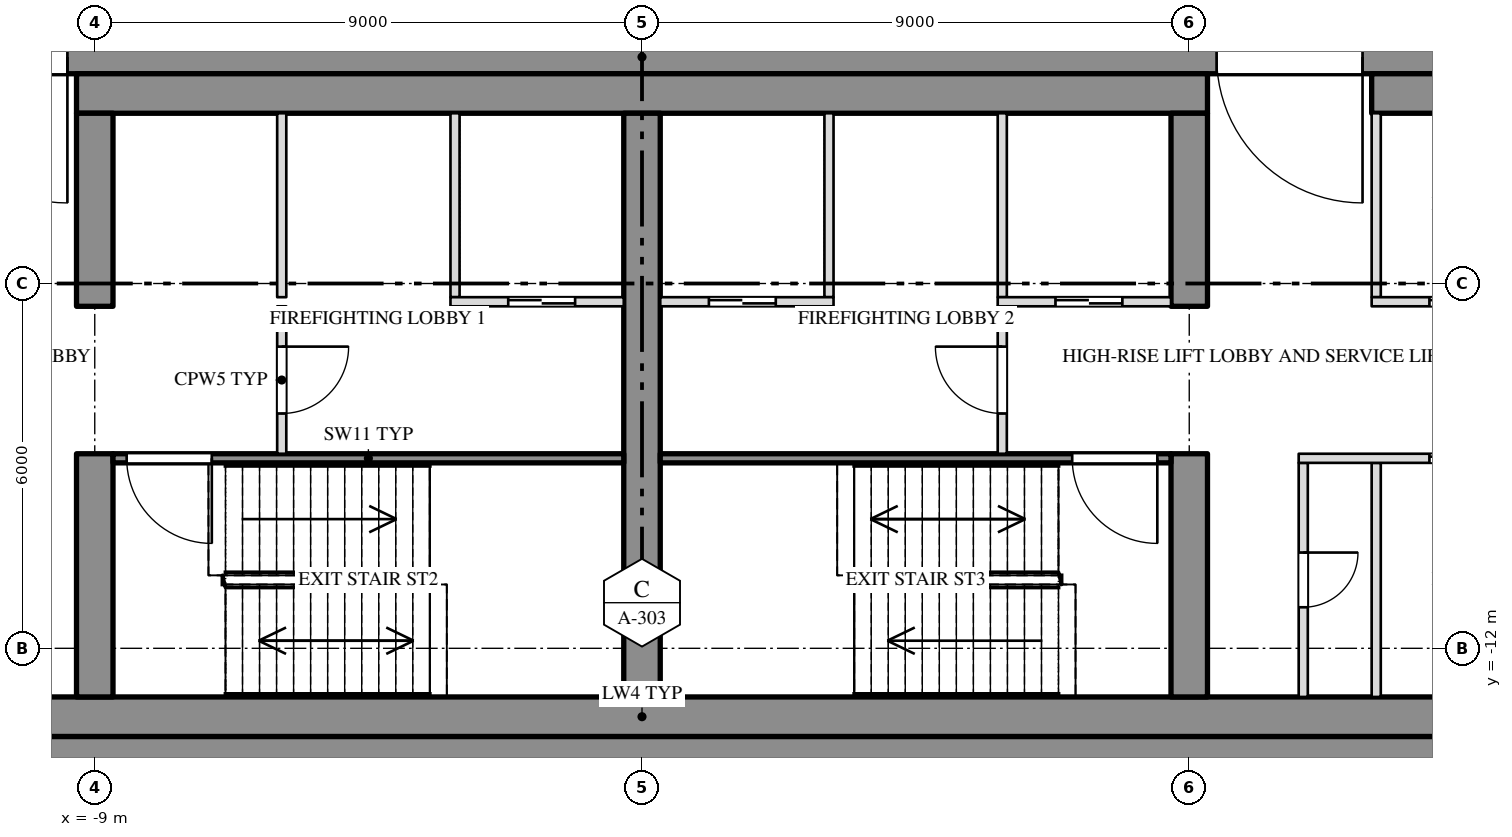
"""IFC4 building model, lengths in metres.
Left out: names, types, materials, properties, quantities, classifications, styles, units other than length and angle.
Written with IfcOpenShell. Run it as: python <this file> out.ifc"""

import sys

from ifc_helpers import new_model, si_unit, direction, frame, frame_2d, origin, place, context, subcontext, project, spatial, rectangle, extrude, element, fill, save


model = new_model("IFC4")
c1 = context("Model", 3, precision=1e-05, world=origin(), true_north=direction((0.0, 1.0)))
c2 = subcontext(c1, "Body", "Model", "MODEL_VIEW")
j1 = project(units=[si_unit("LENGTHUNIT", "METRE"), si_unit("PLANEANGLEUNIT", "RADIAN")], contexts=[c1])
p1 = place(None, origin())
s1 = spatial("IfcSite", under=j1, at=p1, CompositionType="ELEMENT")
p2 = place(p1, origin())
s2 = spatial("IfcBuilding", under=s1, at=p2, CompositionType="ELEMENT")
p3 = place(p2, frame((0.0, 0.0, 288.5)))
s3 = spatial("IfcBuildingStorey", under=s2, at=p3, CompositionType="ELEMENT", Elevation=288.5)
p4 = place(p3, frame((-27.0, -2.275, 0.0), z_axis=(0.0, 0.0, 1.0), x_axis=(1.0, 0.0, 0.0)))
e1 = element("IfcWall", 1, at=p4, inside=s3, PredefinedType="SHEAR", context=c2, shape_type="SweptSolid", body=[
    extrude(rectangle(XDim=54.0, YDim=0.55, at=frame_2d((27.0, 0.0))), origin(), (0.0, 0.0, 1.0), 3.78),
])
p5 = place(p4, frame((15.15, 0.0, 0.0)))
e2 = element("IfcOpeningElement", 2, at=p5, cuts=e1, PredefinedType="OPENING", context=c2, shape_type="SweptSolid", body=[
    extrude(rectangle(XDim=2.4, YDim=2.1, at=frame_2d((1.2, 1.05))), frame((0.0, 0.287, 0.0), z_axis=(0.0, -1.0, 0.0), x_axis=(1.0, 0.0, 0.0)), (0.0, 0.0, 1.0), 0.574),
])
p6 = place(p4, frame((36.45, 0.0, 0.0)))
e3 = element("IfcOpeningElement", 3, at=p6, cuts=e1, PredefinedType="OPENING", context=c2, shape_type="SweptSolid", body=[
    extrude(rectangle(XDim=2.4, YDim=2.1, at=frame_2d((1.2, 1.05))), frame((0.0, 0.287, 0.0), z_axis=(0.0, -1.0, 0.0), x_axis=(1.0, 0.0, 0.0)), (0.0, 0.0, 1.0), 0.574),
])
p7 = place(p3, frame((-27.0, -13.725, 0.0), z_axis=(0.0, 0.0, 1.0), x_axis=(1.0, 0.0, 0.0)))
e4 = element("IfcWall", 4, at=p7, inside=s3, PredefinedType="SHEAR", context=c2, shape_type="SweptSolid", body=[
    extrude(rectangle(XDim=54.0, YDim=0.55, at=frame_2d((27.0, 0.0))), origin(), (0.0, 0.0, 1.0), 3.78),
])
p8 = place(p3, frame((-9.3, -2.875, 0.0), z_axis=(0.0, 0.0, 1.0), x_axis=(1.0, 0.0, 0.0)))
e5 = element("IfcWall", 5, at=p8, inside=s3, PredefinedType="SHEAR", context=c2, shape_type="SweptSolid", body=[
    extrude(rectangle(XDim=18.6, YDim=0.65, at=frame_2d((9.3, 0.0))), origin(), (0.0, 0.0, 1.0), 3.78),
])
p9 = place(p3, frame((12.0, -2.875, 0.0), z_axis=(0.0, 0.0, 1.0), x_axis=(1.0, 0.0, 0.0)))
e6 = element("IfcWall", 6, at=p9, inside=s3, PredefinedType="SHEAR", context=c2, shape_type="SweptSolid", body=[
    extrude(rectangle(XDim=14.45, YDim=0.65, at=frame_2d((7.225, 0.0))), origin(), (0.0, 0.0, 1.0), 3.78),
])
p10 = place(p3, frame((-26.45, -13.125, 0.0), z_axis=(0.0, 0.0, 1.0), x_axis=(1.0, 0.0, 0.0)))
e7 = element("IfcWall", 7, at=p10, inside=s3, PredefinedType="SHEAR", context=c2, shape_type="SweptSolid", body=[
    extrude(rectangle(XDim=52.9, YDim=0.65, at=frame_2d((26.45, 0.0))), origin(), (0.0, 0.0, 1.0), 3.78),
])
p11 = place(p3, frame((-9.0, -12.8, 0.0), z_axis=(0.0, 0.0, 1.0), x_axis=(0.0, 1.0, 0.0)))
e8 = element("IfcWall", 8, at=p11, inside=s3, PredefinedType="SHEAR", context=c2, shape_type="SweptSolid", body=[
    extrude(rectangle(XDim=4.0, YDim=0.6, at=frame_2d((2.0, 0.0))), origin(), (0.0, 0.0, 1.0), 3.78),
])
p12 = place(p3, frame((-9.0, -6.375, 0.0), z_axis=(0.0, 0.0, 1.0), x_axis=(0.0, 1.0, 0.0)))
e9 = element("IfcWall", 9, at=p12, inside=s3, PredefinedType="SHEAR", context=c2, shape_type="SweptSolid", body=[
    extrude(rectangle(XDim=3.175, YDim=0.6, at=frame_2d((1.587, 0.0))), origin(), (0.0, 0.0, 1.0), 3.78),
])
p13 = place(p3, frame((0.0, -12.8, 0.0), z_axis=(0.0, 0.0, 1.0), x_axis=(0.0, 1.0, 0.0)))
e10 = element("IfcWall", 10, at=p13, inside=s3, PredefinedType="SHEAR", context=c2, shape_type="SweptSolid", body=[
    extrude(rectangle(XDim=9.6, YDim=0.6, at=frame_2d((4.8, 0.0))), origin(), (0.0, 0.0, 1.0), 3.78),
])
p14 = place(p3, frame((9.0, -12.8, 0.0), z_axis=(0.0, 0.0, 1.0), x_axis=(0.0, 1.0, 0.0)))
e11 = element("IfcWall", 11, at=p14, inside=s3, PredefinedType="SHEAR", context=c2, shape_type="SweptSolid", body=[
    extrude(rectangle(XDim=4.0, YDim=0.6, at=frame_2d((2.0, 0.0))), origin(), (0.0, 0.0, 1.0), 3.78),
])
p15 = place(p3, frame((9.0, -6.375, 0.0), z_axis=(0.0, 0.0, 1.0), x_axis=(0.0, 1.0, 0.0)))
e12 = element("IfcWall", 12, at=p15, inside=s3, PredefinedType="SHEAR", context=c2, shape_type="SweptSolid", body=[
    extrude(rectangle(XDim=3.175, YDim=0.6, at=frame_2d((1.587, 0.0))), origin(), (0.0, 0.0, 1.0), 3.78),
])
for number, where, z_axis, x_axis in (
    (13, (-3.075, -6.225, 0.0), (0.0, 0.0, 1.0), (0.0, 1.0, 0.0)),
    (14, (-5.925, -6.225, 0.0), (0.0, 0.0, 1.0), (0.0, 1.0, 0.0)),
    (15, (3.075, -6.225, 0.0), (0.0, 0.0, 1.0), (0.0, 1.0, 0.0)),
    (16, (5.925, -6.225, 0.0), (0.0, 0.0, 1.0), (0.0, 1.0, 0.0)),
    (17, (12.075, -6.225, 0.0), (0.0, 0.0, 1.0), (0.0, 1.0, 0.0)),
):
    element("IfcWall", number, at=place(p3, frame(where, z_axis=z_axis, x_axis=x_axis)), inside=s3, PredefinedType="PARTITIONING", context=c2, shape_type="SweptSolid", body=[
        extrude(rectangle(XDim=3.025, YDim=0.15, at=frame_2d((1.513, 0.0))), origin(), (0.0, 0.0, 1.0), 3.78),
    ])
p16 = place(p3, frame((10.875, -12.8, 0.0), z_axis=(0.0, 0.0, 1.0), x_axis=(0.0, 1.0, 0.0)))
e18 = element("IfcWall", 18, at=p16, inside=s3, PredefinedType="PARTITIONING", context=c2, shape_type="SweptSolid", body=[
    extrude(rectangle(XDim=3.85, YDim=0.15, at=frame_2d((1.925, 0.0))), origin(), (0.0, 0.0, 1.0), 3.78),
])
p17 = place(p16, frame((1.475, 0.0, 0.0)))
e19 = element("IfcOpeningElement", 19, at=p17, cuts=e18, PredefinedType="OPENING", context=c2, shape_type="SweptSolid", body=[
    extrude(rectangle(XDim=0.9, YDim=2.1, at=frame_2d((0.45, 1.05))), frame((0.0, 0.087, 0.0), z_axis=(0.0, -1.0, 0.0), x_axis=(1.0, 0.0, 0.0)), (0.0, 0.0, 1.0), 0.174),
])
p18 = place(p3, frame((12.075, -12.8, 0.0), z_axis=(0.0, 0.0, 1.0), x_axis=(0.0, 1.0, 0.0)))
e20 = element("IfcWall", 20, at=p18, inside=s3, PredefinedType="PARTITIONING", context=c2, shape_type="SweptSolid", body=[
    extrude(rectangle(XDim=3.85, YDim=0.15, at=frame_2d((1.925, 0.0))), origin(), (0.0, 0.0, 1.0), 3.78),
])
p19 = place(p3, frame((-5.925, -8.8, 0.0), z_axis=(0.0, 0.0, 1.0), x_axis=(0.0, 1.0, 0.0)))
e21 = element("IfcWall", 21, at=p19, inside=s3, PredefinedType="PARTITIONING", context=c2, shape_type="SweptSolid", body=[
    extrude(rectangle(XDim=2.425, YDim=0.15, at=frame_2d((1.212, 0.0))), origin(), (0.0, 0.0, 1.0), 3.78),
])
p20 = place(p19, frame((0.662, 0.0, 0.0)))
e22 = element("IfcOpeningElement", 22, at=p20, cuts=e21, PredefinedType="OPENING", context=c2, shape_type="SweptSolid", body=[
    extrude(rectangle(XDim=1.1, YDim=2.1, at=frame_2d((0.55, 1.05))), frame((0.0, 0.087, 0.0), z_axis=(0.0, -1.0, 0.0), x_axis=(1.0, 0.0, 0.0)), (0.0, 0.0, 1.0), 0.174),
])
p21 = place(p3, frame((5.925, -8.8, 0.0), z_axis=(0.0, 0.0, 1.0), x_axis=(0.0, 1.0, 0.0)))
e23 = element("IfcWall", 23, at=p21, inside=s3, PredefinedType="PARTITIONING", context=c2, shape_type="SweptSolid", body=[
    extrude(rectangle(XDim=2.425, YDim=0.15, at=frame_2d((1.212, 0.0))), origin(), (0.0, 0.0, 1.0), 3.78),
])
p22 = place(p21, frame((0.662, 0.0, 0.0)))
e24 = element("IfcOpeningElement", 24, at=p22, cuts=e23, PredefinedType="OPENING", context=c2, shape_type="SweptSolid", body=[
    extrude(rectangle(XDim=1.1, YDim=2.1, at=frame_2d((0.55, 1.05))), frame((0.0, 0.087, 0.0), z_axis=(0.0, -1.0, 0.0), x_axis=(1.0, 0.0, 0.0)), (0.0, 0.0, 1.0), 0.174),
])
p23 = place(p3, frame((-3.15, -6.3, 0.0), z_axis=(0.0, 0.0, 1.0), x_axis=(1.0, 0.0, 0.0)))
e25 = element("IfcWall", 25, at=p23, inside=s3, PredefinedType="PARTITIONING", context=c2, shape_type="SweptSolid", body=[
    extrude(rectangle(XDim=2.85, YDim=0.15, at=frame_2d((1.425, 0.0))), origin(), (0.0, 0.0, 1.0), 3.78),
])
p24 = place(p23, frame((0.95, 0.0, 0.0)))
e26 = element("IfcOpeningElement", 26, at=p24, cuts=e25, PredefinedType="OPENING", context=c2, shape_type="SweptSolid", body=[
    extrude(rectangle(XDim=1.1, YDim=2.1, at=frame_2d((0.55, 1.05))), frame((0.0, 0.087, 0.0), z_axis=(0.0, -1.0, 0.0), x_axis=(1.0, 0.0, 0.0)), (0.0, 0.0, 1.0), 0.174),
])
p25 = place(p3, frame((0.3, -6.3, 0.0), z_axis=(0.0, 0.0, 1.0), x_axis=(1.0, 0.0, 0.0)))
e27 = element("IfcWall", 27, at=p25, inside=s3, PredefinedType="PARTITIONING", context=c2, shape_type="SweptSolid", body=[
    extrude(rectangle(XDim=2.85, YDim=0.15, at=frame_2d((1.425, 0.0))), origin(), (0.0, 0.0, 1.0), 3.78),
])
p26 = place(p25, frame((0.8, 0.0, 0.0)))
e28 = element("IfcOpeningElement", 28, at=p26, cuts=e27, PredefinedType="OPENING", context=c2, shape_type="SweptSolid", body=[
    extrude(rectangle(XDim=1.1, YDim=2.1, at=frame_2d((0.55, 1.05))), frame((0.0, 0.087, 0.0), z_axis=(0.0, -1.0, 0.0), x_axis=(1.0, 0.0, 0.0)), (0.0, 0.0, 1.0), 0.174),
])
p27 = place(p3, frame((5.85, -6.3, 0.0), z_axis=(0.0, 0.0, 1.0), x_axis=(1.0, 0.0, 0.0)))
e29 = element("IfcWall", 29, at=p27, inside=s3, PredefinedType="PARTITIONING", context=c2, shape_type="SweptSolid", body=[
    extrude(rectangle(XDim=2.85, YDim=0.15, at=frame_2d((1.425, 0.0))), origin(), (0.0, 0.0, 1.0), 3.78),
])
p28 = place(p27, frame((0.95, 0.0, 0.0)))
e30 = element("IfcOpeningElement", 30, at=p28, cuts=e29, PredefinedType="OPENING", context=c2, shape_type="SweptSolid", body=[
    extrude(rectangle(XDim=1.1, YDim=2.1, at=frame_2d((0.55, 1.05))), frame((0.0, 0.087, 0.0), z_axis=(0.0, -1.0, 0.0), x_axis=(1.0, 0.0, 0.0)), (0.0, 0.0, 1.0), 0.174),
])
p29 = place(p3, frame((12.0, -6.3, 0.0), z_axis=(0.0, 0.0, 1.0), x_axis=(1.0, 0.0, 0.0)))
e31 = element("IfcWall", 31, at=p29, inside=s3, PredefinedType="PARTITIONING", context=c2, shape_type="SweptSolid", body=[
    extrude(rectangle(XDim=5.7, YDim=0.15, at=frame_2d((2.85, 0.0))), origin(), (0.0, 0.0, 1.0), 3.78),
])
p30 = place(p29, frame((0.95, 0.0, 0.0)))
e32 = element("IfcOpeningElement", 32, at=p30, cuts=e31, PredefinedType="OPENING", context=c2, shape_type="SweptSolid", body=[
    extrude(rectangle(XDim=1.1, YDim=2.1, at=frame_2d((0.55, 1.05))), frame((0.0, 0.087, 0.0), z_axis=(0.0, -1.0, 0.0), x_axis=(1.0, 0.0, 0.0)), (0.0, 0.0, 1.0), 0.174),
])
p31 = place(p29, frame((3.8, 0.0, 0.0)))
e33 = element("IfcOpeningElement", 33, at=p31, cuts=e31, PredefinedType="OPENING", context=c2, shape_type="SweptSolid", body=[
    extrude(rectangle(XDim=1.1, YDim=2.1, at=frame_2d((0.55, 1.05))), frame((0.0, 0.087, 0.0), z_axis=(0.0, -1.0, 0.0), x_axis=(1.0, 0.0, 0.0)), (0.0, 0.0, 1.0), 0.174),
])
p32 = place(p3, frame((-8.7, -8.875, 0.0), z_axis=(0.0, 0.0, 1.0), x_axis=(1.0, 0.0, 0.0)))
e34 = element("IfcWall", 34, at=p32, inside=s3, PredefinedType="SHEAR", context=c2, shape_type="SweptSolid", body=[
    extrude(rectangle(XDim=8.4, YDim=0.15, at=frame_2d((4.2, 0.0))), origin(), (0.0, 0.0, 1.0), 3.78),
])
p33 = place(p32, frame((0.225, 0.0, 0.0)))
e35 = element("IfcOpeningElement", 35, at=p33, cuts=e34, PredefinedType="OPENING", context=c2, shape_type="SweptSolid", body=[
    extrude(rectangle(XDim=1.4, YDim=2.1, at=frame_2d((0.7, 1.05))), frame((0.0, 0.087, 0.0), z_axis=(0.0, -1.0, 0.0), x_axis=(1.0, 0.0, 0.0)), (0.0, 0.0, 1.0), 0.174),
])
p34 = place(p3, frame((0.3, -8.875, 0.0), z_axis=(0.0, 0.0, 1.0), x_axis=(1.0, 0.0, 0.0)))
e36 = element("IfcWall", 36, at=p34, inside=s3, PredefinedType="SHEAR", context=c2, shape_type="SweptSolid", body=[
    extrude(rectangle(XDim=8.4, YDim=0.15, at=frame_2d((4.2, 0.0))), origin(), (0.0, 0.0, 1.0), 3.78),
])
p35 = place(p34, frame((6.775, 0.0, 0.0)))
e37 = element("IfcOpeningElement", 37, at=p35, cuts=e36, PredefinedType="OPENING", context=c2, shape_type="SweptSolid", body=[
    extrude(rectangle(XDim=1.4, YDim=2.1, at=frame_2d((0.7, 1.05))), frame((0.0, 0.087, 0.0), z_axis=(0.0, -1.0, 0.0), x_axis=(1.0, 0.0, 0.0)), (0.0, 0.0, 1.0), 0.174),
])
p36 = place(p3, frame((10.8, -8.875, 0.0), z_axis=(0.0, 0.0, 1.0), x_axis=(1.0, 0.0, 0.0)))
e38 = element("IfcWall", 38, at=p36, inside=s3, PredefinedType="PARTITIONING", context=c2, shape_type="SweptSolid", body=[
    extrude(rectangle(XDim=6.9, YDim=0.15, at=frame_2d((3.45, 0.0))), origin(), (0.0, 0.0, 1.0), 3.78),
])
p37 = place(p36, frame((2.15, 0.0, 0.0)))
e39 = element("IfcOpeningElement", 39, at=p37, cuts=e38, PredefinedType="OPENING", context=c2, shape_type="SweptSolid", body=[
    extrude(rectangle(XDim=1.1, YDim=2.1, at=frame_2d((0.55, 1.05))), frame((0.0, 0.087, 0.0), z_axis=(0.0, -1.0, 0.0), x_axis=(1.0, 0.0, 0.0)), (0.0, 0.0, 1.0), 0.174),
])
p38 = place(p36, frame((5.0, 0.0, 0.0)))
e40 = element("IfcOpeningElement", 40, at=p38, cuts=e38, PredefinedType="OPENING", context=c2, shape_type="SweptSolid", body=[
    extrude(rectangle(XDim=1.1, YDim=2.1, at=frame_2d((0.55, 1.05))), frame((0.0, 0.087, 0.0), z_axis=(0.0, -1.0, 0.0), x_axis=(1.0, 0.0, 0.0)), (0.0, 0.0, 1.0), 0.174),
])
p39 = place(p5, origin())
e41 = element("IfcDoor", 41, at=p39, inside=s3, OperationType="DOUBLE_DOOR_SINGLE_SWING", PredefinedType="DOOR", context=c2, shape_type="SweptSolid", body=[
    extrude(rectangle(XDim=2.4, YDim=2.1, at=frame_2d((1.2, 1.05))), frame((0.0, 0.025, 0.0), z_axis=(0.0, -1.0, 0.0), x_axis=(1.0, 0.0, 0.0)), (0.0, 0.0, 1.0), 0.05),
])
fill(e2, e41)
p40 = place(p33, origin())
e42 = element("IfcDoor", 42, at=p40, inside=s3, OperationType="DOUBLE_DOOR_SINGLE_SWING", PredefinedType="DOOR", context=c2, shape_type="SweptSolid", body=[
    extrude(rectangle(XDim=1.4, YDim=2.1, at=frame_2d((0.7, 1.05))), frame((0.0, 0.025, 0.0), z_axis=(0.0, -1.0, 0.0), x_axis=(1.0, 0.0, 0.0)), (0.0, 0.0, 1.0), 0.05),
])
fill(e35, e42)
p41 = place(p20, origin())
e43 = element("IfcDoor", 43, at=p41, inside=s3, OperationType="SINGLE_SWING_LEFT", PredefinedType="DOOR", context=c2, shape_type="SweptSolid", body=[
    extrude(rectangle(XDim=1.1, YDim=2.1, at=frame_2d((0.55, 1.05))), frame((0.0, 0.025, 0.0), z_axis=(0.0, -1.0, 0.0), x_axis=(1.0, 0.0, 0.0)), (0.0, 0.0, 1.0), 0.05),
])
fill(e22, e43)
p42 = place(p24, origin())
e44 = element("IfcDoor", 44, at=p42, inside=s3, OperationType="SLIDING_TO_LEFT", PredefinedType="DOOR", context=c2, shape_type="SweptSolid", body=[
    extrude(rectangle(XDim=1.1, YDim=2.1, at=frame_2d((0.55, 1.05))), frame((0.0, 0.025, 0.0), z_axis=(0.0, -1.0, 0.0), x_axis=(1.0, 0.0, 0.0)), (0.0, 0.0, 1.0), 0.05),
])
fill(e26, e44)
p43 = place(p26, origin())
e45 = element("IfcDoor", 45, at=p43, inside=s3, OperationType="SLIDING_TO_RIGHT", PredefinedType="DOOR", context=c2, shape_type="SweptSolid", body=[
    extrude(rectangle(XDim=1.1, YDim=2.1, at=frame_2d((0.55, 1.05))), frame((0.0, 0.025, 0.0), z_axis=(0.0, -1.0, 0.0), x_axis=(1.0, 0.0, 0.0)), (0.0, 0.0, 1.0), 0.05),
])
fill(e28, e45)
p44 = place(p22, origin())
e46 = element("IfcDoor", 46, at=p44, inside=s3, OperationType="SINGLE_SWING_RIGHT", PredefinedType="DOOR", context=c2, shape_type="SweptSolid", body=[
    extrude(rectangle(XDim=1.1, YDim=2.1, at=frame_2d((0.55, 1.05))), frame((0.0, 0.025, 0.0), z_axis=(0.0, -1.0, 0.0), x_axis=(1.0, 0.0, 0.0)), (0.0, 0.0, 1.0), 0.05),
])
fill(e24, e46)
p45 = place(p28, origin())
e47 = element("IfcDoor", 47, at=p45, inside=s3, OperationType="SLIDING_TO_RIGHT", PredefinedType="DOOR", context=c2, shape_type="SweptSolid", body=[
    extrude(rectangle(XDim=1.1, YDim=2.1, at=frame_2d((0.55, 1.05))), frame((0.0, 0.025, 0.0), z_axis=(0.0, -1.0, 0.0), x_axis=(1.0, 0.0, 0.0)), (0.0, 0.0, 1.0), 0.05),
])
fill(e30, e47)
p46 = place(p35, origin())
e48 = element("IfcDoor", 48, at=p46, inside=s3, OperationType="DOUBLE_DOOR_SINGLE_SWING", PredefinedType="DOOR", context=c2, shape_type="SweptSolid", body=[
    extrude(rectangle(XDim=1.4, YDim=2.1, at=frame_2d((0.7, 1.05))), frame((0.0, 0.025, 0.0), z_axis=(0.0, -1.0, 0.0), x_axis=(1.0, 0.0, 0.0)), (0.0, 0.0, 1.0), 0.05),
])
fill(e37, e48)
p47 = place(p6, origin())
e49 = element("IfcDoor", 49, at=p47, inside=s3, OperationType="DOUBLE_DOOR_SINGLE_SWING", PredefinedType="DOOR", context=c2, shape_type="SweptSolid", body=[
    extrude(rectangle(XDim=2.4, YDim=2.1, at=frame_2d((1.2, 1.05))), frame((0.0, 0.025, 0.0), z_axis=(0.0, -1.0, 0.0), x_axis=(1.0, 0.0, 0.0)), (0.0, 0.0, 1.0), 0.05),
])
fill(e3, e49)
p48 = place(p17, origin())
e50 = element("IfcDoor", 50, at=p48, inside=s3, OperationType="SINGLE_SWING_LEFT", PredefinedType="DOOR", context=c2, shape_type="SweptSolid", body=[
    extrude(rectangle(XDim=0.9, YDim=2.1, at=frame_2d((0.45, 1.05))), frame((0.0, 0.025, 0.0), z_axis=(0.0, -1.0, 0.0), x_axis=(1.0, 0.0, 0.0)), (0.0, 0.0, 1.0), 0.05),
])
fill(e19, e50)
p49 = place(p37, origin())
e51 = element("IfcDoor", 51, at=p49, inside=s3, OperationType="SLIDING_TO_RIGHT", PredefinedType="DOOR", context=c2, shape_type="SweptSolid", body=[
    extrude(rectangle(XDim=1.1, YDim=2.1, at=frame_2d((0.55, 1.05))), frame((0.0, 0.025, 0.0), z_axis=(0.0, -1.0, 0.0), x_axis=(1.0, 0.0, 0.0)), (0.0, 0.0, 1.0), 0.05),
])
fill(e39, e51)
p50 = place(p30, origin())
e52 = element("IfcDoor", 52, at=p50, inside=s3, OperationType="SLIDING_TO_LEFT", PredefinedType="DOOR", context=c2, shape_type="SweptSolid", body=[
    extrude(rectangle(XDim=1.1, YDim=2.1, at=frame_2d((0.55, 1.05))), frame((0.0, 0.025, 0.0), z_axis=(0.0, -1.0, 0.0), x_axis=(1.0, 0.0, 0.0)), (0.0, 0.0, 1.0), 0.05),
])
fill(e32, e52)
save(model, sys.argv[1])
